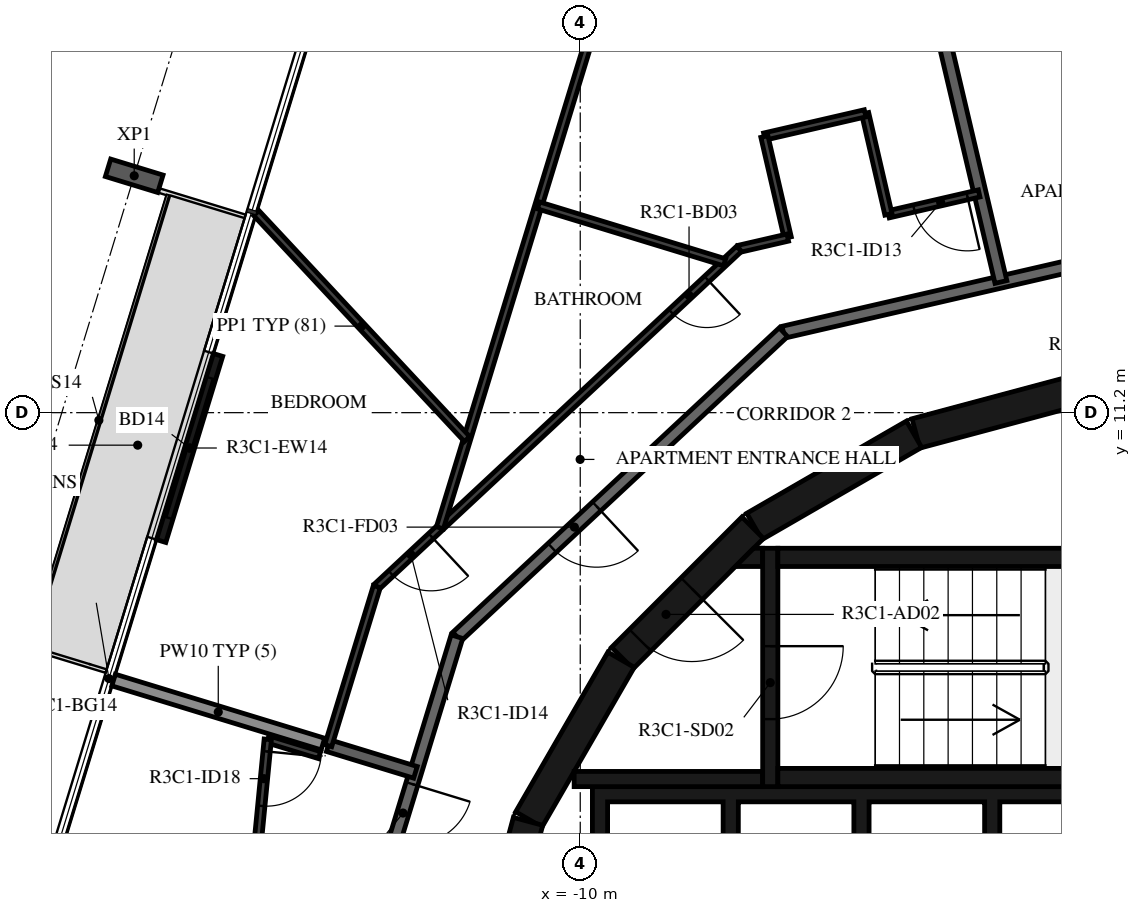
"""IFC4 building model, lengths in metres.
Left out: names, types, materials, properties, quantities, classifications, styles, units other than length and angle.
Written with IfcOpenShell. Run it as: python <this file> out.ifc"""

import sys

from ifc_helpers import new_model, si_unit, direction, frame, frame_2d, origin, origin_2d, place, context, subcontext, project, spatial, polyline, rectangle, i_section, outline, extrude, element, fill, save


model = new_model("IFC4")
c1 = context("Model", 3, precision=1e-05, world=origin(), true_north=direction((0.0, 1.0)))
c2 = subcontext(c1, "Body", "Model", "MODEL_VIEW")
j1 = project(units=[si_unit("LENGTHUNIT", "METRE"), si_unit("PLANEANGLEUNIT", "RADIAN")], contexts=[c1])
p1 = place(None, origin())
s1 = spatial("IfcSite", under=j1, at=p1, CompositionType="ELEMENT")
p2 = place(p1, origin())
s2 = spatial("IfcBuilding", under=s1, at=p2, CompositionType="ELEMENT")
p3 = place(p2, frame((0.0, 0.0, 137.9)))
s3 = spatial("IfcBuildingStorey", under=s2, at=p3, CompositionType="ELEMENT", Elevation=137.9)
p4 = place(p3, frame((-17.335, 15.095, -0.38), z_axis=(0.0, 0.0, 1.0), x_axis=(0.29237190653, 0.956304694264, 0.0)))
e1 = element("IfcColumn", 1, at=p4, inside=s3, PredefinedType="COLUMN", context=c2, shape_type="SweptSolid", body=[
    extrude(i_section(OverallWidth=0.3, OverallDepth=0.9, WebThickness=0.019, FlangeThickness=0.035, FilletRadius=0.03, at=origin_2d()), origin(), (0.0, 0.0, 1.0), 3.5),
])
p5 = place(p3, frame((-15.956, 12.149, 0.0), z_axis=(0.0, 0.0, 1.0), x_axis=(-0.29243949851, -0.956284026695, 0.0)))
e2 = element("IfcWall", 2, at=p5, inside=s3, PredefinedType="STANDARD", context=c2, shape_type="SweptSolid", body=[
    extrude(rectangle(XDim=3.2, YDim=0.16, at=frame_2d((1.6, 0.0))), origin(), (0.0, 0.0, 1.0), 3.12),
])
p6 = place(p5, frame((0.4, 0.0, 0.0)))
e3 = element("IfcOpeningElement", 3, at=p6, cuts=e2, PredefinedType="OPENING", context=c2, shape_type="SweptSolid", body=[
    extrude(rectangle(XDim=2.4, YDim=2.4, at=frame_2d((1.2, 1.2))), frame((0.0, 0.09, 0.0), z_axis=(0.0, -1.0, 0.0), x_axis=(1.0, 0.0, 0.0)), (0.0, 0.0, 1.0), 0.18),
])
for number, where, z_axis, x_axis in (
    (4, (-1.55, 11.643, 0.0), (0.0, 0.0, 1.0), (-0.966, -0.259, 0.0)),
    (5, (-4.51, 10.845, 0.0), (0.0, 0.0, 1.0), (-0.866, -0.5, 0.0)),
):
    element("IfcWall", number, at=place(p3, frame(where, z_axis=z_axis, x_axis=x_axis)), inside=s3, PredefinedType="SHEAR", context=c2, shape_type="SweptSolid", body=[
        extrude(rectangle(XDim=3.033, YDim=0.5, at=frame_2d((1.516, 0.0))), origin(), (0.0, 0.0, 1.0), 3.12),
    ])
p7 = place(p3, frame((-7.164, 9.308, 0.0), z_axis=(0.0, 0.0, 1.0), x_axis=(-0.707106781187, -0.707106781187, 0.0)))
e6 = element("IfcWall", 6, at=p7, inside=s3, PredefinedType="SHEAR", context=c2, shape_type="SweptSolid", body=[
    extrude(rectangle(XDim=3.032, YDim=0.5, at=frame_2d((1.516, 0.0))), origin(), (0.0, 0.0, 1.0), 3.12),
])
p8 = place(p7, frame((1.416, 0.0, 0.0)))
e7 = element("IfcOpeningElement", 7, at=p8, cuts=e6, PredefinedType="OPENING", context=c2, shape_type="SweptSolid", body=[
    extrude(rectangle(XDim=1.2, YDim=2.1, at=frame_2d((0.6, 1.05))), frame((0.0, 0.26, 0.0), z_axis=(0.0, -1.0, 0.0), x_axis=(1.0, 0.0, 0.0)), (0.0, 0.0, 1.0), 0.52),
])
for number, where, z_axis, x_axis in (
    (8, (-9.329, 7.137, 0.0), (0.0, 0.0, 1.0), (-0.5, -0.866, 0.0)),
    (9, (-10.858, 4.479, 0.0), (0.0, 0.0, 1.0), (-0.259, -0.966, 0.0)),
):
    element("IfcWall", number, at=place(p3, frame(where, z_axis=z_axis, x_axis=x_axis)), inside=s3, PredefinedType="SHEAR", context=c2, shape_type="SweptSolid", body=[
        extrude(rectangle(XDim=3.033, YDim=0.5, at=frame_2d((1.516, 0.0))), origin(), (0.0, 0.0, 1.0), 3.12),
    ])
for number, where, z_axis, x_axis in (
    (10, (-6.75, 5.2, 0.0), (0.0, 0.0, 1.0), (1.0, 0.0, 0.0)),
    (11, (-6.75, 8.82, 0.0), (0.0, 0.0, 1.0), (1.0, 0.0, 0.0)),
):
    element("IfcWall", number, at=place(p3, frame(where, z_axis=z_axis, x_axis=x_axis)), inside=s3, PredefinedType="SHEAR", context=c2, shape_type="SweptSolid", body=[
        extrude(rectangle(XDim=6.75, YDim=0.3, at=frame_2d((3.375, 0.0))), origin(), (0.0, 0.0, 1.0), 3.12),
    ])
p9 = place(p3, frame((-6.875, 8.97, 0.0), z_axis=(0.0, 0.0, 1.0), x_axis=(0.0, -1.0, 0.0)))
e12 = element("IfcWall", 12, at=p9, inside=s3, PredefinedType="SHEAR", context=c2, shape_type="SweptSolid", body=[
    extrude(rectangle(XDim=3.92, YDim=0.25, at=frame_2d((1.96, 0.0))), origin(), (0.0, 0.0, 1.0), 3.12),
])
p10 = place(p9, frame((1.61, 0.0, 0.0)))
e13 = element("IfcOpeningElement", 13, at=p10, cuts=e12, PredefinedType="OPENING", context=c2, shape_type="SweptSolid", body=[
    extrude(rectangle(XDim=1.2, YDim=2.1, at=frame_2d((0.6, 1.05))), frame((0.0, 0.135, 0.0), z_axis=(0.0, -1.0, 0.0), x_axis=(1.0, 0.0, 0.0)), (0.0, 0.0, 1.0), 0.27),
])
p11 = place(p3, frame((-7.0, 5.175, 0.0), z_axis=(0.0, 0.0, 1.0), x_axis=(-1.0, 0.0, 0.0)))
e14 = element("IfcWall", 14, at=p11, inside=s3, PredefinedType="SHEAR", context=c2, shape_type="SweptSolid", body=[
    extrude(rectangle(XDim=3.1, YDim=0.25, at=frame_2d((1.55, 0.0))), origin(), (0.0, 0.0, 1.0), 3.12),
])
p12 = place(p3, origin())
e15 = element("IfcWall", 15, at=p12, inside=s3, PredefinedType="SHEAR", context=c2, shape_type="SweptSolid", body=[
    extrude(outline(polyline([(-7.148, 8.97), (-7.0, 8.97), (-7.0, 8.67), (-7.448, 8.67), (-7.148, 8.97)])), origin(), (0.0, 0.0, 1.0), 3.12),
])
p13 = place(p3, origin())
e16 = element("IfcWall", 16, at=p13, inside=s3, PredefinedType="SHEAR", context=c2, shape_type="SweptSolid", body=[
    extrude(outline(polyline([(-9.55, 4.8), (-7.65, 4.8), (-7.65, 1.9), (-7.4, 1.9), (-7.4, 4.8), (-5.5, 4.8), (-5.5, 1.9), (-5.25, 1.9), (-5.25, 4.8), (-3.35, 4.8), (-3.35, 1.9), (-3.1, 1.9), (-3.1, 4.8), (-1.2, 4.8), (-1.2, 1.9), (-0.95, 1.9), (-0.95, 4.8), (0.95, 4.8), (0.95, 1.9), (1.2, 1.9), (1.2, 4.8), (3.1, 4.8), (3.1, 1.9), (3.35, 1.9), (3.35, 4.8), (5.25, 4.8), (5.25, 1.9), (5.5, 1.9), (5.5, 4.8), (7.4, 4.8), (7.4, 1.9), (7.65, 1.9), (7.65, 4.8), (9.55, 4.8), (9.55, 1.9), (9.8, 1.9), (9.8, 4.8), (9.8, 5.05), (-9.8, 5.05), (-9.8, 4.8), (-9.8, 1.9), (-9.55, 1.9), (-9.55, 4.8)])), origin(), (0.0, 0.0, 1.0), 3.12),
])
p14 = place(p3, frame((0.495, 14.175, 0.0), z_axis=(0.0, 0.0, 1.0), x_axis=(-0.974376622151, -0.224922649383, 0.0)))
e17 = element("IfcWall", 17, at=p14, inside=s3, PredefinedType="STANDARD", context=c2, shape_type="SweptSolid", body=[
    extrude(rectangle(XDim=7.342, YDim=0.2, at=frame_2d((3.671, 0.0))), origin(), (0.0, 0.0, 1.0), 3.12),
])
p15 = place(p3, frame((-6.659, 12.523, 0.0), z_axis=(0.0, 0.0, 1.0), x_axis=(-0.731350455479, -0.682001841105, 0.0)))
e18 = element("IfcWall", 18, at=p15, inside=s3, PredefinedType="STANDARD", context=c2, shape_type="SweptSolid", body=[
    extrude(rectangle(XDim=7.342, YDim=0.2, at=frame_2d((3.671, 0.0))), origin(), (0.0, 0.0, 1.0), 3.12),
])
p16 = place(p15, frame((4.2, 0.0, 0.0)))
e19 = element("IfcOpeningElement", 19, at=p16, cuts=e18, PredefinedType="OPENING", context=c2, shape_type="SweptSolid", body=[
    extrude(rectangle(XDim=1.0, YDim=2.1, at=frame_2d((0.5, 1.05))), frame((0.0, 0.11, 0.0), z_axis=(0.0, -1.0, 0.0), x_axis=(1.0, 0.0, 0.0)), (0.0, 0.0, 1.0), 0.22),
])
p17 = place(p3, frame((-12.028, 7.516, 0.0), z_axis=(0.0, 0.0, 1.0), x_axis=(-0.292365533182, -0.956306642771, 0.0)))
e20 = element("IfcWall", 20, at=p17, inside=s3, PredefinedType="STANDARD", context=c2, shape_type="SweptSolid", body=[
    extrude(rectangle(XDim=7.342, YDim=0.2, at=frame_2d((3.671, 0.0))), origin(), (0.0, 0.0, 1.0), 3.12),
])
p18 = place(p17, frame((2.533, 0.0, 0.0)))
e21 = element("IfcOpeningElement", 21, at=p18, cuts=e20, PredefinedType="OPENING", context=c2, shape_type="SweptSolid", body=[
    extrude(rectangle(XDim=1.0, YDim=2.1, at=frame_2d((0.5, 1.05))), frame((0.0, 0.11, 0.0), z_axis=(0.0, -1.0, 0.0), x_axis=(1.0, 0.0, 0.0)), (0.0, 0.0, 1.0), 0.22),
])
p19 = place(p3, frame((-4.281, 18.448, 0.0), z_axis=(0.0, 0.0, 1.0), x_axis=(0.228867856942, -0.973457499873, 0.0)))
e22 = element("IfcWall", 22, at=p19, inside=s3, PredefinedType="STANDARD", context=c2, shape_type="SweptSolid", body=[
    extrude(rectangle(XDim=5.238, YDim=0.2, at=frame_2d((2.619, 0.0))), origin(), (0.0, 0.0, 1.0), 3.12),
])
p20 = place(p3, frame((-14.145, 5.724, 0.0), z_axis=(0.0, 0.0, 1.0), x_axis=(0.956266872747, -0.292495586439, 0.0)))
e23 = element("IfcWall", 23, at=p20, inside=s3, PredefinedType="STANDARD", context=c2, shape_type="SweptSolid", body=[
    extrude(rectangle(XDim=1.5, YDim=0.2, at=frame_2d((0.75, 0.0))), origin(), (0.0, 0.0, 1.0), 3.12),
])
p21 = place(p3, frame((-17.674, 6.803, 0.0), z_axis=(0.0, 0.0, 1.0), x_axis=(0.956293645939, -0.292408041504, 0.0)))
e24 = element("IfcWall", 24, at=p21, inside=s3, PredefinedType="STANDARD", context=c2, shape_type="SweptSolid", body=[
    extrude(rectangle(XDim=3.6, YDim=0.2, at=frame_2d((1.8, 0.0))), origin(), (0.0, 0.0, 1.0), 2.73),
])
p22 = place(p3, frame((-1.404, 15.276, 0.0), z_axis=(0.0, 0.0, 1.0), x_axis=(-0.224947305813, 0.974370930194, 0.0)))
e25 = element("IfcWall", 25, at=p22, inside=s3, PredefinedType="PARTITIONING", context=c2, shape_type="SweptSolid", body=[
    extrude(rectangle(XDim=5.28, YDim=0.12, at=frame_2d((2.64, 0.0))), origin(), (0.0, 0.0, 1.0), 3.12),
])
p23 = place(p3, frame((-3.44, 14.806, 0.0), z_axis=(0.0, 0.0, 1.0), x_axis=(-0.974356244071, -0.225010910046, 0.0)))
e26 = element("IfcWall", 26, at=p23, inside=s3, PredefinedType="PARTITIONING", context=c2, shape_type="SweptSolid", body=[
    extrude(rectangle(XDim=1.531, YDim=0.12, at=frame_2d((0.766, 0.0))), origin(), (0.0, 0.0, 1.0), 3.12),
])
p24 = place(p23, frame((0.2, 0.0, 0.0)))
e27 = element("IfcOpeningElement", 27, at=p24, cuts=e26, PredefinedType="OPENING", context=c2, shape_type="SweptSolid", body=[
    extrude(rectangle(XDim=0.9, YDim=2.1, at=frame_2d((0.45, 1.05))), frame((0.0, 0.07, 0.0), z_axis=(0.0, -1.0, 0.0), x_axis=(1.0, 0.0, 0.0)), (0.0, 0.0, 1.0), 0.14),
])
p25 = place(p3, frame((-4.931, 14.461, 0.0), z_axis=(0.0, 0.0, 1.0), x_axis=(-0.224911785629, 0.974379129849, 0.0)))
e28 = element("IfcWall", 28, at=p25, inside=s3, PredefinedType="PARTITIONING", context=c2, shape_type="SweptSolid", body=[
    extrude(rectangle(XDim=1.705, YDim=0.12, at=frame_2d((0.853, 0.0))), origin(), (0.0, 0.0, 1.0), 3.12),
])
p26 = place(p3, frame((-5.315, 16.123, 0.0), z_axis=(0.0, 0.0, 1.0), x_axis=(-0.974352456598, -0.225027310168, 0.0)))
e29 = element("IfcWall", 29, at=p26, inside=s3, PredefinedType="PARTITIONING", context=c2, shape_type="SweptSolid", body=[
    extrude(rectangle(XDim=1.7, YDim=0.12, at=frame_2d((0.85, 0.0))), origin(), (0.0, 0.0, 1.0), 3.12),
])
p27 = place(p3, frame((-6.971, 15.74, 0.0), z_axis=(0.0, 0.0, 1.0), x_axis=(0.224943164347, -0.974371886301, 0.0)))
e30 = element("IfcWall", 30, at=p27, inside=s3, PredefinedType="PARTITIONING", context=c2, shape_type="SweptSolid", body=[
    extrude(rectangle(XDim=1.705, YDim=0.12, at=frame_2d((0.853, 0.0))), origin(), (0.0, 0.0, 1.0), 3.12),
])
p28 = place(p3, frame((-6.588, 14.079, 0.0), z_axis=(0.0, 0.0, 1.0), x_axis=(-0.974391195695, -0.224859506699, 0.0)))
e31 = element("IfcWall", 31, at=p28, inside=s3, PredefinedType="PARTITIONING", context=c2, shape_type="SweptSolid", body=[
    extrude(rectangle(XDim=0.821, YDim=0.12, at=frame_2d((0.41, 0.0))), origin(), (0.0, 0.0, 1.0), 3.12),
])
p29 = place(p3, frame((-7.388, 13.894, 0.0), z_axis=(0.0, 0.0, 1.0), x_axis=(-0.731357186721, -0.681994622729, 0.0)))
e32 = element("IfcWall", 32, at=p29, inside=s3, PredefinedType="PARTITIONING", context=c2, shape_type="SweptSolid", body=[
    extrude(rectangle(XDim=8.146, YDim=0.12, at=frame_2d((4.073, 0.0))), origin(), (0.0, 0.0, 1.0), 3.12),
])
p30 = place(p29, frame((0.725, 0.0, 0.0)))
e33 = element("IfcOpeningElement", 33, at=p30, cuts=e32, PredefinedType="OPENING", context=c2, shape_type="SweptSolid", body=[
    extrude(rectangle(XDim=0.8, YDim=2.1, at=frame_2d((0.4, 1.05))), frame((0.0, 0.07, 0.0), z_axis=(0.0, -1.0, 0.0), x_axis=(1.0, 0.0, 0.0)), (0.0, 0.0, 1.0), 0.14),
])
p31 = place(p29, frame((6.927, 0.0, 0.0)))
e34 = element("IfcOpeningElement", 34, at=p31, cuts=e32, PredefinedType="OPENING", context=c2, shape_type="SweptSolid", body=[
    extrude(rectangle(XDim=0.9, YDim=2.1, at=frame_2d((0.45, 1.05))), frame((0.0, 0.07, 0.0), z_axis=(0.0, -1.0, 0.0), x_axis=(1.0, 0.0, 0.0)), (0.0, 0.0, 1.0), 0.14),
])
p32 = place(p3, frame((-13.345, 8.339, 0.0), z_axis=(0.0, 0.0, 1.0), x_axis=(-0.292316072367, -0.956321762712, 0.0)))
e35 = element("IfcWall", 35, at=p32, inside=s3, PredefinedType="PARTITIONING", context=c2, shape_type="SweptSolid", body=[
    extrude(rectangle(XDim=2.734, YDim=0.12, at=frame_2d((1.367, 0.0))), origin(), (0.0, 0.0, 1.0), 3.12),
])
p33 = place(p3, frame((-8.417, 22.031, 0.0), z_axis=(0.0, 0.0, 1.0), x_axis=(-0.292371891841, -0.956304698755, 0.0)))
e36 = element("IfcWall", 36, at=p33, inside=s3, PredefinedType="PARTITIONING", context=c2, shape_type="SweptSolid", body=[
    extrude(rectangle(XDim=13.306, YDim=0.12, at=frame_2d((6.653, 0.0))), origin(), (0.0, 0.0, 1.0), 3.12),
])
p34 = place(p33, frame((2.777, 0.0, 0.0)))
e37 = element("IfcOpeningElement", 37, at=p34, cuts=e36, PredefinedType="OPENING", context=c2, shape_type="SweptSolid", body=[
    extrude(rectangle(XDim=0.9, YDim=2.1, at=frame_2d((0.45, 1.05))), frame((0.0, 0.07, 0.0), z_axis=(0.0, -1.0, 0.0), x_axis=(1.0, 0.0, 0.0)), (0.0, 0.0, 1.0), 0.14),
])
p35 = place(p3, frame((-10.687, 14.608, 0.0), z_axis=(0.0, 0.0, 1.0), x_axis=(0.956295309419, -0.292402601189, 0.0)))
e38 = element("IfcWall", 38, at=p35, inside=s3, PredefinedType="PARTITIONING", context=c2, shape_type="SweptSolid", body=[
    extrude(rectangle(XDim=3.201, YDim=0.12, at=frame_2d((1.601, 0.0))), origin(), (0.0, 0.0, 1.0), 3.12),
])
p36 = place(p3, frame((-15.327, 14.481, 0.0), z_axis=(0.0, 0.0, 1.0), x_axis=(0.68197575128, -0.731374783997, 0.0)))
e39 = element("IfcWall", 39, at=p36, inside=s3, PredefinedType="PARTITIONING", context=c2, shape_type="SweptSolid", body=[
    extrude(rectangle(XDim=5.081, YDim=0.12, at=frame_2d((2.54, 0.0))), origin(), (0.0, 0.0, 1.0), 3.12),
])
p37 = place(p3, frame((-14.287, 5.568, 0.0), z_axis=(0.0, 0.0, 1.0), x_axis=(-0.956287662261, 0.292427609859, 0.0)))
e40 = element("IfcWall", 40, at=p37, inside=s3, PredefinedType="PARTITIONING", context=c2, shape_type="SweptSolid", body=[
    extrude(rectangle(XDim=0.89, YDim=0.12, at=frame_2d((0.445, 0.0))), origin(), (0.0, 0.0, 1.0), 3.12),
])
p38 = place(p3, frame((-15.138, 5.828, 0.0), z_axis=(0.0, 0.0, 1.0), x_axis=(-0.096967255409, -0.995287572201, 0.0)))
e41 = element("IfcWall", 41, at=p38, inside=s3, PredefinedType="PARTITIONING", context=c2, shape_type="SweptSolid", body=[
    extrude(rectangle(XDim=4.489, YDim=0.12, at=frame_2d((2.245, 0.0))), origin(), (0.0, 0.0, 1.0), 3.12),
])
p39 = place(p38, frame((0.2, 0.0, 0.0)))
e42 = element("IfcOpeningElement", 42, at=p39, cuts=e41, PredefinedType="OPENING", context=c2, shape_type="SweptSolid", body=[
    extrude(rectangle(XDim=0.9, YDim=2.1, at=frame_2d((0.45, 1.05))), frame((0.0, 0.07, 0.0), z_axis=(0.0, -1.0, 0.0), x_axis=(1.0, 0.0, 0.0)), (0.0, 0.0, 1.0), 0.14),
])
p40 = place(p6, origin())
e43 = element("IfcDoor", 43, at=p40, inside=s3, OperationType="DOUBLE_DOOR_SLIDING", PredefinedType="DOOR", context=c2, shape_type="SweptSolid", body=[
    extrude(rectangle(XDim=2.4, YDim=2.4, at=frame_2d((1.2, 1.2))), frame((0.0, 0.025, 0.0), z_axis=(0.0, -1.0, 0.0), x_axis=(1.0, 0.0, 0.0)), (0.0, 0.0, 1.0), 0.05),
])
fill(e3, e43)
p41 = place(p10, origin())
e44 = element("IfcDoor", 44, at=p41, inside=s3, OperationType="SINGLE_SWING_LEFT", PredefinedType="DOOR", context=c2, shape_type="SweptSolid", body=[
    extrude(rectangle(XDim=1.2, YDim=2.1, at=frame_2d((0.6, 1.05))), frame((0.0, 0.025, 0.0), z_axis=(0.0, -1.0, 0.0), x_axis=(1.0, 0.0, 0.0)), (0.0, 0.0, 1.0), 0.05),
])
fill(e13, e44)
p42 = place(p8, origin())
e45 = element("IfcDoor", 45, at=p42, inside=s3, OperationType="SINGLE_SWING_RIGHT", PredefinedType="DOOR", context=c2, shape_type="SweptSolid", body=[
    extrude(rectangle(XDim=1.2, YDim=2.1, at=frame_2d((0.6, 1.05))), frame((0.0, 0.025, 0.0), z_axis=(0.0, -1.0, 0.0), x_axis=(1.0, 0.0, 0.0)), (0.0, 0.0, 1.0), 0.05),
])
fill(e7, e45)
p43 = place(p16, origin())
e46 = element("IfcDoor", 46, at=p43, inside=s3, OperationType="SINGLE_SWING_LEFT", PredefinedType="DOOR", context=c2, shape_type="SweptSolid", body=[
    extrude(rectangle(XDim=1.0, YDim=2.1, at=frame_2d((0.5, 1.05))), frame((0.0, 0.025, 0.0), z_axis=(0.0, -1.0, 0.0), x_axis=(1.0, 0.0, 0.0)), (0.0, 0.0, 1.0), 0.05),
])
fill(e19, e46)
p44 = place(p24, origin())
e47 = element("IfcDoor", 47, at=p44, inside=s3, OperationType="SINGLE_SWING_LEFT", PredefinedType="DOOR", context=c2, shape_type="SweptSolid", body=[
    extrude(rectangle(XDim=0.9, YDim=2.1, at=frame_2d((0.45, 1.05))), frame((0.0, 0.025, 0.0), z_axis=(0.0, -1.0, 0.0), x_axis=(1.0, 0.0, 0.0)), (0.0, 0.0, 1.0), 0.05),
])
fill(e27, e47)
p45 = place(p30, origin())
e48 = element("IfcDoor", 48, at=p45, inside=s3, OperationType="SINGLE_SWING_LEFT", PredefinedType="DOOR", context=c2, shape_type="SweptSolid", body=[
    extrude(rectangle(XDim=0.8, YDim=2.1, at=frame_2d((0.4, 1.05))), frame((0.0, 0.025, 0.0), z_axis=(0.0, -1.0, 0.0), x_axis=(1.0, 0.0, 0.0)), (0.0, 0.0, 1.0), 0.05),
])
fill(e33, e48)
p46 = place(p31, origin())
e49 = element("IfcDoor", 49, at=p46, inside=s3, OperationType="SINGLE_SWING_LEFT", PredefinedType="DOOR", context=c2, shape_type="SweptSolid", body=[
    extrude(rectangle(XDim=0.9, YDim=2.1, at=frame_2d((0.45, 1.05))), frame((0.0, 0.025, 0.0), z_axis=(0.0, -1.0, 0.0), x_axis=(1.0, 0.0, 0.0)), (0.0, 0.0, 1.0), 0.05),
])
fill(e34, e49)
p47 = place(p18, origin())
e50 = element("IfcDoor", 50, at=p47, inside=s3, OperationType="SINGLE_SWING_LEFT", PredefinedType="DOOR", context=c2, shape_type="SweptSolid", body=[
    extrude(rectangle(XDim=1.0, YDim=2.1, at=frame_2d((0.5, 1.05))), frame((0.0, 0.025, 0.0), z_axis=(0.0, -1.0, 0.0), x_axis=(1.0, 0.0, 0.0)), (0.0, 0.0, 1.0), 0.05),
])
fill(e21, e50)
p48 = place(p39, origin())
e51 = element("IfcDoor", 51, at=p48, inside=s3, OperationType="SINGLE_SWING_LEFT", PredefinedType="DOOR", context=c2, shape_type="SweptSolid", body=[
    extrude(rectangle(XDim=0.9, YDim=2.1, at=frame_2d((0.45, 1.05))), frame((0.0, 0.025, 0.0), z_axis=(0.0, -1.0, 0.0), x_axis=(1.0, 0.0, 0.0)), (0.0, 0.0, 1.0), 0.05),
])
fill(e42, e51)
save(model, sys.argv[1])
